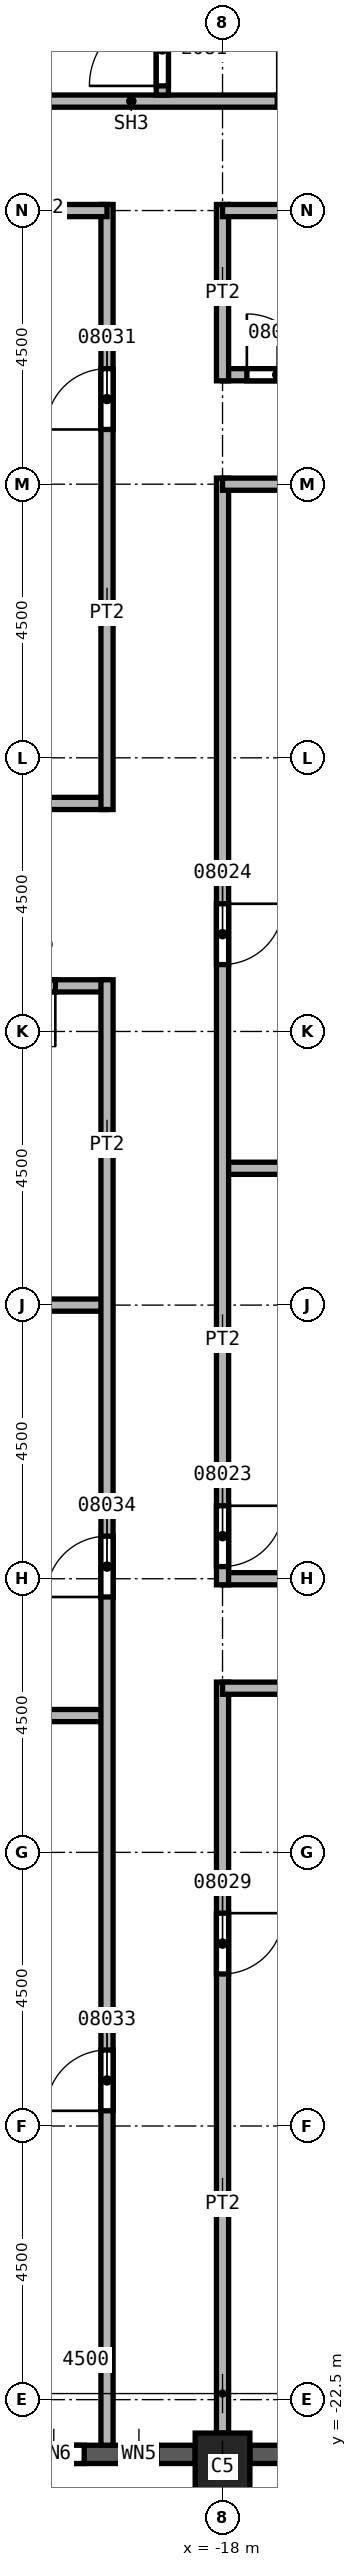
"""IFC4 building model, lengths in metres.
Left out: names, types, materials, properties, quantities, classifications, styles, units other than length and angle.
Written with IfcOpenShell. Run it as: python <this file> out.ifc"""

import sys

from ifc_helpers import new_model, si_unit, direction, frame, frame_2d, origin, origin_2d, place, context, subcontext, project, spatial, rectangle, extrude, element, fill, save


model = new_model("IFC4")
c1 = context("Model", 3, precision=1e-05, world=origin(), true_north=direction((0.0, 1.0)))
c2 = subcontext(c1, "Body", "Model", "MODEL_VIEW")
j1 = project(units=[si_unit("LENGTHUNIT", "METRE"), si_unit("PLANEANGLEUNIT", "RADIAN")], contexts=[c1])
p1 = place(None, origin())
s1 = spatial("IfcSite", under=j1, at=p1, CompositionType="ELEMENT")
p2 = place(p1, origin())
s2 = spatial("IfcBuilding", under=s1, at=p2, CompositionType="ELEMENT")
p3 = place(p2, frame((0.0, 0.0, 150.0)))
s3 = spatial("IfcBuildingStorey", under=s2, at=p3, CompositionType="ELEMENT", Elevation=150.0)
p4 = place(p3, frame((-18.0, -23.6, 0.0), z_axis=(0.0, 0.0, 1.0), x_axis=(1.0, 0.0, 0.0)))
e1 = element("IfcColumn", 1, at=p4, inside=s3, PredefinedType="COLUMN", context=c2, shape_type="SweptSolid", body=[
    extrude(rectangle(XDim=0.9, YDim=1.1, at=origin_2d()), origin(), (0.0, 0.0, 1.0), 3.7),
])
p5 = place(p3, frame((-22.05, -23.4, 0.0), z_axis=(0.0, 0.0, 1.0), x_axis=(1.0, 0.0, 0.0)))
e2 = element("IfcWall", 2, at=p5, inside=s3, PredefinedType="SOLIDWALL", context=c2, shape_type="SweptSolid", body=[
    extrude(rectangle(XDim=3.6, YDim=0.3, at=frame_2d((1.8, 0.0))), origin(), (0.0, 0.0, 1.0), 3.1),
])
p6 = place(p5, frame((0.775, 0.0, 0.8)))
e3 = element("IfcOpeningElement", 3, at=p6, cuts=e2, PredefinedType="OPENING", context=c2, shape_type="SweptSolid", body=[
    extrude(rectangle(XDim=1.0, YDim=1.95, at=frame_2d((0.5, 0.975))), frame((0.0, 0.15, 0.0), z_axis=(0.0, -1.0, 0.0), x_axis=(1.0, 0.0, 0.0)), (0.0, 0.0, 1.0), 0.3),
])
p7 = place(p5, frame((2.375, 0.0, 0.8)))
e4 = element("IfcOpeningElement", 4, at=p7, cuts=e2, PredefinedType="OPENING", context=c2, shape_type="SweptSolid", body=[
    extrude(rectangle(XDim=0.6, YDim=1.95, at=frame_2d((0.3, 0.975))), frame((0.0, 0.15, 0.0), z_axis=(0.0, -1.0, 0.0), x_axis=(1.0, 0.0, 0.0)), (0.0, 0.0, 1.0), 0.3),
])
p8 = place(p3, frame((-17.55, -23.4, 0.0), z_axis=(0.0, 0.0, 1.0), x_axis=(1.0, 0.0, 0.0)))
e5 = element("IfcWall", 5, at=p8, inside=s3, PredefinedType="SOLIDWALL", context=c2, shape_type="SweptSolid", body=[
    extrude(rectangle(XDim=3.6, YDim=0.3, at=frame_2d((1.8, 0.0))), origin(), (0.0, 0.0, 1.0), 3.1),
])
p9 = place(p8, frame((0.6, 0.0, 0.8)))
e6 = element("IfcOpeningElement", 6, at=p9, cuts=e5, PredefinedType="OPENING", context=c2, shape_type="SweptSolid", body=[
    extrude(rectangle(XDim=2.4, YDim=1.95, at=frame_2d((1.2, 0.975))), frame((0.0, 0.15, 0.0), z_axis=(0.0, -1.0, 0.0), x_axis=(1.0, 0.0, 0.0)), (0.0, 0.0, 1.0), 0.3),
])
p10 = place(p3, frame((-33.85, 3.75, 0.0), z_axis=(0.0, 0.0, 1.0), x_axis=(1.0, 0.0, 0.0)))
e7 = element("IfcWall", 7, at=p10, inside=s3, PredefinedType="PARTITIONING", context=c2, shape_type="SweptSolid", body=[
    extrude(rectangle(XDim=13.95, YDim=0.2, at=frame_2d((6.975, 0.0))), origin(), (0.0, 0.0, 1.0), 3.7),
])
p11 = place(p3, frame((-19.9, 0.75, 0.0), z_axis=(0.0, 0.0, 1.0), x_axis=(-1.0, 0.0, 0.0)))
e8 = element("IfcWall", 8, at=p11, inside=s3, PredefinedType="PARTITIONING", context=c2, shape_type="SweptSolid", body=[
    extrude(rectangle(XDim=13.95, YDim=0.2, at=frame_2d((6.975, 0.0))), origin(), (0.0, 0.0, 1.0), 3.7),
])
p12 = place(p11, frame((0.85, 0.0, 0.0)))
e9 = element("IfcOpeningElement", 9, at=p12, cuts=e8, PredefinedType="OPENING", context=c2, shape_type="SweptSolid", body=[
    extrude(rectangle(XDim=1.0, YDim=2.1, at=frame_2d((0.5, 1.05))), frame((0.0, 0.1, 0.0), z_axis=(0.0, -1.0, 0.0), x_axis=(1.0, 0.0, 0.0)), (0.0, 0.0, 1.0), 0.2),
])
p13 = place(p11, frame((10.4, 0.0, 0.0)))
e10 = element("IfcOpeningElement", 10, at=p13, cuts=e8, PredefinedType="OPENING", context=c2, shape_type="SweptSolid", body=[
    extrude(rectangle(XDim=1.0, YDim=2.1, at=frame_2d((0.5, 1.05))), frame((0.0, 0.1, 0.0), z_axis=(0.0, -1.0, 0.0), x_axis=(1.0, 0.0, 0.0)), (0.0, 0.0, 1.0), 0.2),
])
for number, where, z_axis, x_axis in (
    (11, (-27.1, -11.25, 0.0), (0.0, 0.0, 1.0), (1.0, 0.0, 0.0)),
    (12, (-27.1, -4.5, 0.0), (0.0, 0.0, 1.0), (1.0, 0.0, 0.0)),
):
    element("IfcWall", number, at=place(p3, frame(where, z_axis=z_axis, x_axis=x_axis)), inside=s3, PredefinedType="PARTITIONING", context=c2, shape_type="SweptSolid", body=[
        extrude(rectangle(XDim=7.2, YDim=0.2, at=frame_2d((3.6, 0.0))), origin(), (0.0, 0.0, 1.0), 3.7),
    ])
p14 = place(p3, frame((-19.9, -23.25, 0.0), z_axis=(0.0, 0.0, 1.0), x_axis=(0.0, 1.0, 0.0)))
e13 = element("IfcWall", 13, at=p14, inside=s3, PredefinedType="PARTITIONING", context=c2, shape_type="SweptSolid", body=[
    extrude(rectangle(XDim=24.1, YDim=0.2, at=frame_2d((12.05, 0.0))), origin(), (0.0, 0.0, 1.0), 3.7),
])
p15 = place(p14, frame((5.5, 0.0, 0.0)))
e14 = element("IfcOpeningElement", 14, at=p15, cuts=e13, PredefinedType="OPENING", context=c2, shape_type="SweptSolid", body=[
    extrude(rectangle(XDim=1.0, YDim=2.1, at=frame_2d((0.5, 1.05))), frame((0.0, 0.1, 0.0), z_axis=(0.0, -1.0, 0.0), x_axis=(1.0, 0.0, 0.0)), (0.0, 0.0, 1.0), 0.2),
])
p16 = place(p14, frame((13.95, 0.0, 0.0)))
e15 = element("IfcOpeningElement", 15, at=p16, cuts=e13, PredefinedType="OPENING", context=c2, shape_type="SweptSolid", body=[
    extrude(rectangle(XDim=1.0, YDim=2.1, at=frame_2d((0.5, 1.05))), frame((0.0, 0.1, 0.0), z_axis=(0.0, -1.0, 0.0), x_axis=(1.0, 0.0, 0.0)), (0.0, 0.0, 1.0), 0.2),
])
p17 = place(p3, frame((-19.9, 3.65, 0.0), z_axis=(0.0, 0.0, 1.0), x_axis=(0.0, 1.0, 0.0)))
e16 = element("IfcWall", 16, at=p17, inside=s3, PredefinedType="PARTITIONING", context=c2, shape_type="SweptSolid", body=[
    extrude(rectangle(XDim=9.95, YDim=0.2, at=frame_2d((4.975, 0.0))), origin(), (0.0, 0.0, 1.0), 3.7),
])
p18 = place(p17, frame((6.25, 0.0, 0.0)))
e17 = element("IfcOpeningElement", 17, at=p18, cuts=e16, PredefinedType="OPENING", context=c2, shape_type="SweptSolid", body=[
    extrude(rectangle(XDim=1.0, YDim=2.1, at=frame_2d((0.5, 1.05))), frame((0.0, 0.1, 0.0), z_axis=(0.0, -1.0, 0.0), x_axis=(1.0, 0.0, 0.0)), (0.0, 0.0, 1.0), 0.2),
])
p19 = place(p3, frame((-19.9, 13.5, 0.0), z_axis=(0.0, 0.0, 1.0), x_axis=(-1.0, 0.0, 0.0)))
e18 = element("IfcWall", 18, at=p19, inside=s3, PredefinedType="PARTITIONING", context=c2, shape_type="SweptSolid", body=[
    extrude(rectangle(XDim=2.1, YDim=0.2, at=frame_2d((1.05, 0.0))), origin(), (0.0, 0.0, 1.0), 3.7),
])
p20 = place(p3, frame((-18.0, -10.7, 0.0), z_axis=(0.0, 0.0, 1.0), x_axis=(0.0, -1.0, 0.0)))
e19 = element("IfcWall", 19, at=p20, inside=s3, PredefinedType="PARTITIONING", context=c2, shape_type="SweptSolid", body=[
    extrude(rectangle(XDim=12.35, YDim=0.2, at=frame_2d((6.175, 0.0))), origin(), (0.0, 0.0, 1.0), 3.7),
])
p21 = place(p20, frame((3.8, 0.0, 0.0)))
e20 = element("IfcOpeningElement", 20, at=p21, cuts=e19, PredefinedType="OPENING", context=c2, shape_type="SweptSolid", body=[
    extrude(rectangle(XDim=1.0, YDim=2.1, at=frame_2d((0.5, 1.05))), frame((0.0, 0.1, 0.0), z_axis=(0.0, -1.0, 0.0), x_axis=(1.0, 0.0, 0.0)), (0.0, 0.0, 1.0), 0.2),
])
for number, where, z_axis, x_axis in (
    (21, (-18.0, -9.0, 0.0), (0.0, 0.0, 1.0), (1.0, 0.0, 0.0)),
    (22, (-18.0, -2.25, 0.0), (0.0, 0.0, 1.0), (1.0, 0.0, 0.0)),
):
    element("IfcWall", number, at=place(p3, frame(where, z_axis=z_axis, x_axis=x_axis)), inside=s3, PredefinedType="PARTITIONING", context=c2, shape_type="SweptSolid", body=[
        extrude(rectangle(XDim=4.5, YDim=0.2, at=frame_2d((2.25, 0.0))), origin(), (0.0, 0.0, 1.0), 3.7),
    ])
p22 = place(p3, frame((-18.0, 9.1, 0.0), z_axis=(0.0, 0.0, 1.0), x_axis=(0.0, -1.0, 0.0)))
e23 = element("IfcWall", 23, at=p22, inside=s3, PredefinedType="PARTITIONING", context=c2, shape_type="SweptSolid", body=[
    extrude(rectangle(XDim=18.2, YDim=0.2, at=frame_2d((9.1, 0.0))), origin(), (0.0, 0.0, 1.0), 3.7),
])
p23 = place(p22, frame((16.9, 0.0, 0.0)))
e24 = element("IfcOpeningElement", 24, at=p23, cuts=e23, PredefinedType="OPENING", context=c2, shape_type="SweptSolid", body=[
    extrude(rectangle(XDim=1.0, YDim=2.1, at=frame_2d((0.5, 1.05))), frame((0.0, 0.1, 0.0), z_axis=(0.0, -1.0, 0.0), x_axis=(1.0, 0.0, 0.0)), (0.0, 0.0, 1.0), 0.2),
])
p24 = place(p22, frame((7.0, 0.0, 0.0)))
e25 = element("IfcOpeningElement", 25, at=p24, cuts=e23, PredefinedType="OPENING", context=c2, shape_type="SweptSolid", body=[
    extrude(rectangle(XDim=1.0, YDim=2.1, at=frame_2d((0.5, 1.05))), frame((0.0, 0.1, 0.0), z_axis=(0.0, -1.0, 0.0), x_axis=(1.0, 0.0, 0.0)), (0.0, 0.0, 1.0), 0.2),
])
p25 = place(p3, frame((-18.0, 10.8, 0.0), z_axis=(0.0, 0.0, 1.0), x_axis=(1.0, 0.0, 0.0)))
e26 = element("IfcWall", 26, at=p25, inside=s3, PredefinedType="PARTITIONING", context=c2, shape_type="SweptSolid", body=[
    extrude(rectangle(XDim=3.6, YDim=0.2, at=frame_2d((1.8, 0.0))), origin(), (0.0, 0.0, 1.0), 3.7),
])
p26 = place(p25, frame((0.4, 0.0, 0.0)))
e27 = element("IfcOpeningElement", 27, at=p26, cuts=e26, PredefinedType="OPENING", context=c2, shape_type="SweptSolid", body=[
    extrude(rectangle(XDim=1.0, YDim=2.1, at=frame_2d((0.5, 1.05))), frame((0.0, 0.1, 0.0), z_axis=(0.0, -1.0, 0.0), x_axis=(1.0, 0.0, 0.0)), (0.0, 0.0, 1.0), 0.2),
])
p27 = place(p3, frame((-18.0, 13.6, 0.0), z_axis=(0.0, 0.0, 1.0), x_axis=(0.0, -1.0, 0.0)))
e28 = element("IfcWall", 28, at=p27, inside=s3, PredefinedType="PARTITIONING", context=c2, shape_type="SweptSolid", body=[
    extrude(rectangle(XDim=2.9, YDim=0.2, at=frame_2d((1.45, 0.0))), origin(), (0.0, 0.0, 1.0), 3.7),
])
p28 = place(p3, frame((-15.3, 13.5, 0.0), z_axis=(0.0, 0.0, 1.0), x_axis=(-1.0, 0.0, 0.0)))
e29 = element("IfcWall", 29, at=p28, inside=s3, PredefinedType="PARTITIONING", context=c2, shape_type="SweptSolid", body=[
    extrude(rectangle(XDim=2.7, YDim=0.2, at=frame_2d((1.35, 0.0))), origin(), (0.0, 0.0, 1.0), 3.7),
])
p29 = place(p3, frame((-14.4, -10.8, 0.0), z_axis=(0.0, 0.0, 1.0), x_axis=(-1.0, 0.0, 0.0)))
e30 = element("IfcWall", 30, at=p29, inside=s3, PredefinedType="PARTITIONING", context=c2, shape_type="SweptSolid", body=[
    extrude(rectangle(XDim=3.6, YDim=0.2, at=frame_2d((1.8, 0.0))), origin(), (0.0, 0.0, 1.0), 3.7),
])
p30 = place(p3, frame((-13.5, 9.0, 0.0), z_axis=(0.0, 0.0, 1.0), x_axis=(-1.0, 0.0, 0.0)))
e31 = element("IfcWall", 31, at=p30, inside=s3, PredefinedType="PARTITIONING", context=c2, shape_type="SweptSolid", body=[
    extrude(rectangle(XDim=4.5, YDim=0.2, at=frame_2d((2.25, 0.0))), origin(), (0.0, 0.0, 1.0), 3.7),
])
p31 = place(p3, frame((-21.9, 15.3, 0.0), z_axis=(0.0, 0.0, 1.0), x_axis=(1.0, 0.0, 0.0)))
e32 = element("IfcWall", 32, at=p31, inside=s3, PredefinedType="SOLIDWALL", context=c2, shape_type="SweptSolid", body=[
    extrude(rectangle(XDim=8.275, YDim=0.2, at=frame_2d((4.137, 0.0))), origin(), (0.0, 0.0, 1.0), 3.7),
])
p32 = place(p31, frame((4.8, 0.0, 0.0)))
e33 = element("IfcOpeningElement", 33, at=p32, cuts=e32, PredefinedType="OPENING", context=c2, shape_type="SweptSolid", body=[
    extrude(rectangle(XDim=1.2, YDim=2.1, at=frame_2d((0.6, 1.05))), frame((0.0, 0.1, 0.0), z_axis=(0.0, -1.0, 0.0), x_axis=(1.0, 0.0, 0.0)), (0.0, 0.0, 1.0), 0.2),
])
p33 = place(p3, frame((-18.99, 15.4, 0.0), z_axis=(0.0, 0.0, 1.0), x_axis=(0.0, 1.0, 0.0)))
e34 = element("IfcWall", 34, at=p33, inside=s3, PredefinedType="SOLIDWALL", context=c2, shape_type="SweptSolid", body=[
    extrude(rectangle(XDim=5.9, YDim=0.2, at=frame_2d((2.95, 0.0))), origin(), (0.0, 0.0, 1.0), 3.7),
])
p34 = place(p33, frame((0.15, 0.0, 0.0)))
e35 = element("IfcOpeningElement", 35, at=p34, cuts=e34, PredefinedType="OPENING", context=c2, shape_type="SweptSolid", body=[
    extrude(rectangle(XDim=1.2, YDim=2.1, at=frame_2d((0.6, 1.05))), frame((0.0, 0.1, 0.0), z_axis=(0.0, -1.0, 0.0), x_axis=(1.0, 0.0, 0.0)), (0.0, 0.0, 1.0), 0.2),
])
p35 = place(p23, origin())
e36 = element("IfcDoor", 36, at=p35, inside=s3, OperationType="SINGLE_SWING_RIGHT", PredefinedType="DOOR", context=c2, shape_type="SweptSolid", body=[
    extrude(rectangle(XDim=1.0, YDim=2.1, at=frame_2d((0.5, 1.05))), frame((0.0, 0.025, 0.0), z_axis=(0.0, -1.0, 0.0), x_axis=(1.0, 0.0, 0.0)), (0.0, 0.0, 1.0), 0.05),
])
fill(e24, e36)
p36 = place(p24, origin())
e37 = element("IfcDoor", 37, at=p36, inside=s3, OperationType="SINGLE_SWING_LEFT", PredefinedType="DOOR", context=c2, shape_type="SweptSolid", body=[
    extrude(rectangle(XDim=1.0, YDim=2.1, at=frame_2d((0.5, 1.05))), frame((0.0, 0.025, 0.0), z_axis=(0.0, -1.0, 0.0), x_axis=(1.0, 0.0, 0.0)), (0.0, 0.0, 1.0), 0.05),
])
fill(e25, e37)
p37 = place(p26, origin())
e38 = element("IfcDoor", 38, at=p37, inside=s3, OperationType="SINGLE_SWING_RIGHT", PredefinedType="DOOR", context=c2, shape_type="SweptSolid", body=[
    extrude(rectangle(XDim=1.0, YDim=2.1, at=frame_2d((0.5, 1.05))), frame((0.0, 0.025, 0.0), z_axis=(0.0, -1.0, 0.0), x_axis=(1.0, 0.0, 0.0)), (0.0, 0.0, 1.0), 0.05),
])
fill(e27, e38)
p38 = place(p21, origin())
e39 = element("IfcDoor", 39, at=p38, inside=s3, OperationType="SINGLE_SWING_RIGHT", PredefinedType="DOOR", context=c2, shape_type="SweptSolid", body=[
    extrude(rectangle(XDim=1.0, YDim=2.1, at=frame_2d((0.5, 1.05))), frame((0.0, 0.025, 0.0), z_axis=(0.0, -1.0, 0.0), x_axis=(1.0, 0.0, 0.0)), (0.0, 0.0, 1.0), 0.05),
])
fill(e20, e39)
p39 = place(p18, origin())
e40 = element("IfcDoor", 40, at=p39, inside=s3, OperationType="SINGLE_SWING_RIGHT", PredefinedType="DOOR", context=c2, shape_type="SweptSolid", body=[
    extrude(rectangle(XDim=1.0, YDim=2.1, at=frame_2d((0.5, 1.05))), frame((0.0, 0.025, 0.0), z_axis=(0.0, -1.0, 0.0), x_axis=(1.0, 0.0, 0.0)), (0.0, 0.0, 1.0), 0.05),
])
fill(e17, e40)
p40 = place(p15, origin())
e41 = element("IfcDoor", 41, at=p40, inside=s3, OperationType="SINGLE_SWING_RIGHT", PredefinedType="DOOR", context=c2, shape_type="SweptSolid", body=[
    extrude(rectangle(XDim=1.0, YDim=2.1, at=frame_2d((0.5, 1.05))), frame((0.0, 0.025, 0.0), z_axis=(0.0, -1.0, 0.0), x_axis=(1.0, 0.0, 0.0)), (0.0, 0.0, 1.0), 0.05),
])
fill(e14, e41)
p41 = place(p16, origin())
e42 = element("IfcDoor", 42, at=p41, inside=s3, OperationType="SINGLE_SWING_LEFT", PredefinedType="DOOR", context=c2, shape_type="SweptSolid", body=[
    extrude(rectangle(XDim=1.0, YDim=2.1, at=frame_2d((0.5, 1.05))), frame((0.0, 0.025, 0.0), z_axis=(0.0, -1.0, 0.0), x_axis=(1.0, 0.0, 0.0)), (0.0, 0.0, 1.0), 0.05),
])
fill(e15, e42)
p42 = place(p12, origin())
e43 = element("IfcDoor", 43, at=p42, inside=s3, OperationType="SINGLE_SWING_RIGHT", PredefinedType="DOOR", context=c2, shape_type="SweptSolid", body=[
    extrude(rectangle(XDim=1.0, YDim=2.1, at=frame_2d((0.5, 1.05))), frame((0.0, 0.025, 0.0), z_axis=(0.0, -1.0, 0.0), x_axis=(1.0, 0.0, 0.0)), (0.0, 0.0, 1.0), 0.05),
])
fill(e9, e43)
p43 = place(p34, origin())
e44 = element("IfcDoor", 44, at=p43, inside=s3, OperationType="SINGLE_SWING_LEFT", PredefinedType="DOOR", context=c2, shape_type="SweptSolid", body=[
    extrude(rectangle(XDim=1.2, YDim=2.1, at=frame_2d((0.6, 1.05))), frame((0.0, 0.025, 0.0), z_axis=(0.0, -1.0, 0.0), x_axis=(1.0, 0.0, 0.0)), (0.0, 0.0, 1.0), 0.05),
])
fill(e35, e44)
p44 = place(p6, origin())
e45 = element("IfcWindow", 45, at=p44, inside=s3, PartitioningType="SINGLE_PANEL", PredefinedType="WINDOW", context=c2, shape_type="SweptSolid", body=[
    extrude(rectangle(XDim=1.0, YDim=1.95, at=frame_2d((0.5, 0.975))), frame((0.0, 0.03, 0.0), z_axis=(0.0, -1.0, 0.0), x_axis=(1.0, 0.0, 0.0)), (0.0, 0.0, 1.0), 0.06),
])
fill(e3, e45)
p45 = place(p7, origin())
e46 = element("IfcWindow", 46, at=p45, inside=s3, PartitioningType="SINGLE_PANEL", PredefinedType="WINDOW", context=c2, shape_type="SweptSolid", body=[
    extrude(rectangle(XDim=0.6, YDim=1.95, at=frame_2d((0.3, 0.975))), frame((0.0, 0.03, 0.0), z_axis=(0.0, -1.0, 0.0), x_axis=(1.0, 0.0, 0.0)), (0.0, 0.0, 1.0), 0.06),
])
fill(e4, e46)
save(model, sys.argv[1])
